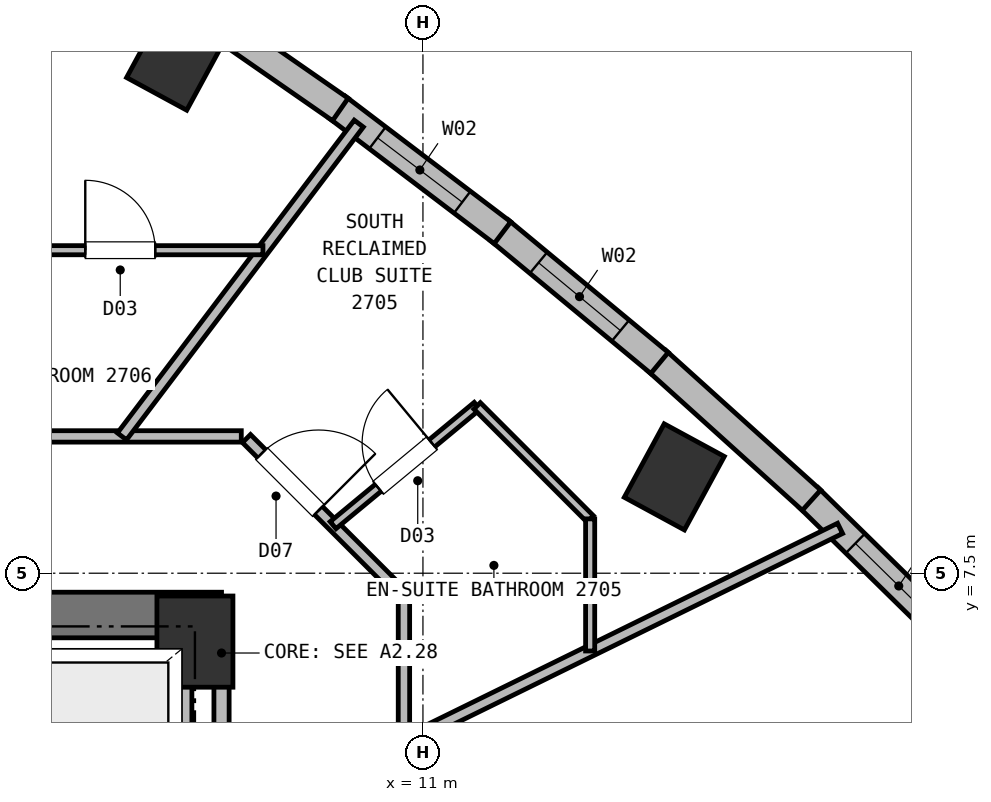
"""IFC4 building model, lengths in metres.
Left out: names, types, materials, properties, quantities, classifications, styles, units other than length and angle.
Written with IfcOpenShell. Run it as: python <this file> out.ifc"""

import sys

from ifc_helpers import new_model, si_unit, direction, frame, frame_2d, origin, origin_2d, place, context, subcontext, project, spatial, rectangle, extrude, element, fill, save


model = new_model("IFC4")
c1 = context("Model", 3, precision=1e-05, world=origin(), true_north=direction((0.0, 1.0)))
c2 = subcontext(c1, "Body", "Model", "MODEL_VIEW")
j1 = project(units=[si_unit("LENGTHUNIT", "METRE"), si_unit("PLANEANGLEUNIT", "RADIAN")], contexts=[c1])
p1 = place(None, origin())
s1 = spatial("IfcSite", under=j1, at=p1, CompositionType="ELEMENT")
p2 = place(p1, origin())
s2 = spatial("IfcBuilding", under=s1, at=p2, CompositionType="ELEMENT")
p3 = place(p2, frame((0.0, 0.0, 101.0)))
s3 = spatial("IfcBuildingStorey", under=s2, at=p3, CompositionType="ELEMENT", Elevation=101.0)
p4 = place(p3, frame((8.0, 6.6, 0.0), z_axis=(0.0, 0.0, 1.0), x_axis=(1.0, 0.0, 0.0)))
e1 = element("IfcColumn", 1, at=p4, inside=s3, PredefinedType="COLUMN", context=c2, shape_type="SweptSolid", body=[
    extrude(rectangle(XDim=1.0, YDim=1.2, at=origin_2d()), origin(), (0.0, 0.0, 1.0), 3.75),
])
p5 = place(p3, frame((-8.35, 6.95, 0.0), z_axis=(0.0, 0.0, 1.0), x_axis=(1.0, 0.0, 0.0)))
e2 = element("IfcWall", 2, at=p5, inside=s3, PredefinedType="SHEAR", context=c2, shape_type="SweptSolid", body=[
    extrude(rectangle(XDim=16.7, YDim=0.6, at=frame_2d((8.35, 0.0))), origin(), (0.0, 0.0, 1.0), 3.5),
])
for number, where, z_axis, x_axis in (
    (3, (14.307, 8.767, 0.0), (0.0, 0.0, 1.0), (-0.879, 0.477, 0.0)),
    (4, (7.759, 14.29, 0.0), (0.0, 0.0, 1.0), (-0.879, 0.477, 0.0)),
):
    element("IfcColumn", number, at=place(p3, frame(where, z_axis=z_axis, x_axis=x_axis)), inside=s3, PredefinedType="COLUMN", context=c2, shape_type="SweptSolid", body=[
        extrude(rectangle(XDim=0.9, YDim=1.1, at=origin_2d()), origin(), (0.0, 0.0, 1.0), 3.75),
    ])
p6 = place(p3, frame((16.075, 8.495, 0.0), z_axis=(0.0, 0.0, 1.0), x_axis=(0.713713584755, -0.70043766242, 0.0)))
e5 = element("IfcWall", 5, at=p6, inside=s3, PredefinedType="SOLIDWALL", context=c2, shape_type="SweptSolid", body=[
    extrude(rectangle(XDim=2.759, YDim=0.36, at=frame_2d((1.379, 0.0))), origin(), (0.0, 0.0, 1.0), 3.5),
])
p7 = place(p6, frame((0.86, 0.0, 0.72)))
e6 = element("IfcOpeningElement", 6, at=p7, cuts=e5, PredefinedType="OPENING", context=c2, shape_type="SweptSolid", body=[
    extrude(rectangle(XDim=1.6, YDim=1.88, at=frame_2d((0.8, 0.94))), frame((0.0, 0.19, 0.0), z_axis=(0.0, -1.0, 0.0), x_axis=(1.0, 0.0, 0.0)), (0.0, 0.0, 1.0), 0.38),
])
p8 = place(p3, frame((14.075, 10.299, 0.0), z_axis=(0.0, 0.0, 1.0), x_axis=(0.742346706701, -0.67001594537, 0.0)))
e7 = element("IfcWall", 7, at=p8, inside=s3, PredefinedType="SOLIDWALL", context=c2, shape_type="SweptSolid", body=[
    extrude(rectangle(XDim=2.744, YDim=0.36, at=frame_2d((1.372, 0.0))), origin(), (0.0, 0.0, 1.0), 3.5),
])
p9 = place(p3, frame((12.007, 12.011, 0.0), z_axis=(0.0, 0.0, 1.0), x_axis=(0.769960149578, -0.63809197461, 0.0)))
e8 = element("IfcWall", 8, at=p9, inside=s3, PredefinedType="SOLIDWALL", context=c2, shape_type="SweptSolid", body=[
    extrude(rectangle(XDim=2.735, YDim=0.36, at=frame_2d((1.367, 0.0))), origin(), (0.0, 0.0, 1.0), 3.5),
])
p10 = place(p9, frame((0.667, 0.0, 0.72)))
e9 = element("IfcOpeningElement", 9, at=p10, cuts=e8, PredefinedType="OPENING", context=c2, shape_type="SweptSolid", body=[
    extrude(rectangle(XDim=1.4, YDim=1.84, at=frame_2d((0.7, 0.92))), frame((0.0, 0.19, 0.0), z_axis=(0.0, -1.0, 0.0), x_axis=(1.0, 0.0, 0.0)), (0.0, 0.0, 1.0), 0.38),
])
p11 = place(p3, frame((9.873, 13.631, 0.0), z_axis=(0.0, 0.0, 1.0), x_axis=(0.796336225349, -0.604854210696, 0.0)))
e10 = element("IfcWall", 10, at=p11, inside=s3, PredefinedType="SOLIDWALL", context=c2, shape_type="SweptSolid", body=[
    extrude(rectangle(XDim=2.73, YDim=0.36, at=frame_2d((1.365, 0.0))), origin(), (0.0, 0.0, 1.0), 3.5),
])
p12 = place(p11, frame((0.665, 0.0, 0.72)))
e11 = element("IfcOpeningElement", 11, at=p12, cuts=e10, PredefinedType="OPENING", context=c2, shape_type="SweptSolid", body=[
    extrude(rectangle(XDim=1.4, YDim=1.84, at=frame_2d((0.7, 0.92))), frame((0.0, 0.19, 0.0), z_axis=(0.0, -1.0, 0.0), x_axis=(1.0, 0.0, 0.0)), (0.0, 0.0, 1.0), 0.38),
])
p13 = place(p3, frame((7.671, 15.159, 0.0), z_axis=(0.0, 0.0, 1.0), x_axis=(0.821331552378, -0.570451120665, 0.0)))
e12 = element("IfcWall", 12, at=p13, inside=s3, PredefinedType="SOLIDWALL", context=c2, shape_type="SweptSolid", body=[
    extrude(rectangle(XDim=2.73, YDim=0.36, at=frame_2d((1.365, 0.0))), origin(), (0.0, 0.0, 1.0), 3.5),
])
p14 = place(p3, frame((7.85, 4.57, 0.0), z_axis=(0.0, 0.0, 1.0), x_axis=(0.0, 1.0, 0.0)))
e13 = element("IfcWall", 13, at=p14, inside=s3, PredefinedType="PARTITIONING", context=c2, shape_type="SweptSolid", body=[
    extrude(rectangle(XDim=2.08, YDim=0.22, at=frame_2d((1.04, 0.0))), origin(), (0.0, 0.0, 1.0), 3.12),
])
p15 = place(p3, frame((8.35, 1.25, 0.0), z_axis=(0.0, 0.0, 1.0), x_axis=(0.0, 1.0, 0.0)))
e14 = element("IfcWall", 14, at=p15, inside=s3, PredefinedType="PARTITIONING", context=c2, shape_type="SweptSolid", body=[
    extrude(rectangle(XDim=5.3, YDim=0.2, at=frame_2d((2.65, 0.0))), origin(), (0.0, 0.0, 1.0), 3.5),
])
p16 = place(p15, frame((0.95, 0.0, 0.0)))
e15 = element("IfcOpeningElement", 15, at=p16, cuts=e14, PredefinedType="OPENING", context=c2, shape_type="SweptSolid", body=[
    extrude(rectangle(XDim=1.15, YDim=2.15, at=frame_2d((0.575, 1.075))), frame((0.0, 0.11, 0.0), z_axis=(0.0, -1.0, 0.0), x_axis=(1.0, 0.0, 0.0)), (0.0, 0.0, 1.0), 0.22),
])
p17 = place(p3, frame((10.75, 7.16, 0.0), z_axis=(0.0, 0.0, 1.0), x_axis=(0.0, -1.0, 0.0)))
e16 = element("IfcWall", 16, at=p17, inside=s3, PredefinedType="PARTITIONING", context=c2, shape_type="SweptSolid", body=[
    extrude(rectangle(XDim=12.92, YDim=0.15, at=frame_2d((6.46, 0.0))), origin(), (0.0, 0.0, 1.0), 3.5),
])
p18 = place(p17, frame((2.937, 0.0, 0.0)))
e17 = element("IfcOpeningElement", 17, at=p18, cuts=e16, PredefinedType="OPENING", context=c2, shape_type="SweptSolid", body=[
    extrude(rectangle(XDim=1.0, YDim=2.15, at=frame_2d((0.5, 1.075))), frame((0.0, 0.085, 0.0), z_axis=(0.0, -1.0, 0.0), x_axis=(1.0, 0.0, 0.0)), (0.0, 0.0, 1.0), 0.17),
])
p19 = place(p17, frame((8.03, 0.0, 0.0)))
e18 = element("IfcOpeningElement", 18, at=p19, cuts=e16, PredefinedType="OPENING", context=c2, shape_type="SweptSolid", body=[
    extrude(rectangle(XDim=1.06, YDim=2.15, at=frame_2d((0.53, 1.075))), frame((0.0, 0.085, 0.0), z_axis=(0.0, -1.0, 0.0), x_axis=(1.0, 0.0, 0.0)), (0.0, 0.0, 1.0), 0.17),
])
p20 = place(p3, frame((8.678, 9.272, 0.0), z_axis=(0.0, 0.0, 1.0), x_axis=(0.707106781187, -0.707106781187, 0.0)))
e19 = element("IfcWall", 19, at=p20, inside=s3, PredefinedType="PARTITIONING", context=c2, shape_type="SweptSolid", body=[
    extrude(rectangle(XDim=2.89, YDim=0.15, at=frame_2d((1.445, 0.0))), origin(), (0.0, 0.0, 1.0), 3.5),
])
p21 = place(p20, frame((0.28, 0.0, 0.0)))
e20 = element("IfcOpeningElement", 20, at=p21, cuts=e19, PredefinedType="OPENING", context=c2, shape_type="SweptSolid", body=[
    extrude(rectangle(XDim=1.06, YDim=2.15, at=frame_2d((0.53, 1.075))), frame((0.0, 0.085, 0.0), z_axis=(0.0, -1.0, 0.0), x_axis=(1.0, 0.0, 0.0)), (0.0, 0.0, 1.0), 0.17),
])
p22 = place(p3, frame((-8.61, 9.3, 0.0), z_axis=(0.0, 0.0, 1.0), x_axis=(1.0, 0.0, 0.0)))
e21 = element("IfcWall", 21, at=p22, inside=s3, PredefinedType="PARTITIONING", context=c2, shape_type="SweptSolid", body=[
    extrude(rectangle(XDim=17.22, YDim=0.15, at=frame_2d((8.61, 0.0))), origin(), (0.0, 0.0, 1.0), 3.5),
])
p23 = place(p22, frame((11.167, 0.0, 0.0)))
e22 = element("IfcOpeningElement", 22, at=p23, cuts=e21, PredefinedType="OPENING", context=c2, shape_type="SweptSolid", body=[
    extrude(rectangle(XDim=1.0, YDim=2.15, at=frame_2d((0.5, 1.075))), frame((0.0, 0.085, 0.0), z_axis=(0.0, -1.0, 0.0), x_axis=(1.0, 0.0, 0.0)), (0.0, 0.0, 1.0), 0.17),
])
p24 = place(p22, frame((6.944, 0.0, 0.0)))
e23 = element("IfcOpeningElement", 23, at=p24, cuts=e21, PredefinedType="OPENING", context=c2, shape_type="SweptSolid", body=[
    extrude(rectangle(XDim=1.06, YDim=2.15, at=frame_2d((0.53, 1.075))), frame((0.0, 0.085, 0.0), z_axis=(0.0, -1.0, 0.0), x_axis=(1.0, 0.0, 0.0)), (0.0, 0.0, 1.0), 0.17),
])
p25 = place(p22, frame((2.311, 0.0, 0.0)))
e24 = element("IfcOpeningElement", 24, at=p25, cuts=e21, PredefinedType="OPENING", context=c2, shape_type="SweptSolid", body=[
    extrude(rectangle(XDim=1.06, YDim=2.15, at=frame_2d((0.53, 1.075))), frame((0.0, 0.085, 0.0), z_axis=(0.0, -1.0, 0.0), x_axis=(1.0, 0.0, 0.0)), (0.0, 0.0, 1.0), 0.17),
])
p26 = place(p3, frame((10.75, 5.274, 0.0), z_axis=(0.0, 0.0, 1.0), x_axis=(0.897755780575, 0.440493539616, 0.0)))
e25 = element("IfcWall", 25, at=p26, inside=s3, PredefinedType="PARTITIONING", context=c2, shape_type="SweptSolid", body=[
    extrude(rectangle(XDim=6.392, YDim=0.15, at=frame_2d((3.196, 0.0))), origin(), (0.0, 0.0, 1.0), 3.5),
])
p27 = place(p3, frame((9.818, 8.132, 0.0), z_axis=(0.0, 0.0, 1.0), x_axis=(0.770088402747, 0.63793718496, 0.0)))
e26 = element("IfcWall", 26, at=p27, inside=s3, PredefinedType="PARTITIONING", context=c2, shape_type="SweptSolid", body=[
    extrude(rectangle(XDim=2.461, YDim=0.12, at=frame_2d((1.23, 0.0))), origin(), (0.0, 0.0, 1.0), 3.5),
])
p28 = place(p27, frame((0.771, 0.0, 0.0)))
e27 = element("IfcOpeningElement", 27, at=p28, cuts=e26, PredefinedType="OPENING", context=c2, shape_type="SweptSolid", body=[
    extrude(rectangle(XDim=0.92, YDim=2.1, at=frame_2d((0.46, 1.05))), frame((0.0, 0.07, 0.0), z_axis=(0.0, -1.0, 0.0), x_axis=(1.0, 0.0, 0.0)), (0.0, 0.0, 1.0), 0.14),
])
p29 = place(p3, frame((11.713, 9.702, 0.0), z_axis=(0.0, 0.0, 1.0), x_axis=(0.707106781187, -0.707106781187, 0.0)))
e28 = element("IfcWall", 28, at=p29, inside=s3, PredefinedType="PARTITIONING", context=c2, shape_type="SweptSolid", body=[
    extrude(rectangle(XDim=2.103, YDim=0.12, at=frame_2d((1.052, 0.0))), origin(), (0.0, 0.0, 1.0), 3.5),
])
p30 = place(p3, frame((13.2, 6.477, 0.0), z_axis=(0.0, 0.0, 1.0), x_axis=(0.0, 1.0, 0.0)))
e29 = element("IfcWall", 29, at=p30, inside=s3, PredefinedType="PARTITIONING", context=c2, shape_type="SweptSolid", body=[
    extrude(rectangle(XDim=1.738, YDim=0.12, at=frame_2d((0.869, 0.0))), origin(), (0.0, 0.0, 1.0), 3.5),
])
p31 = place(p3, frame((7.04, 9.3, 0.0), z_axis=(0.0, 0.0, 1.0), x_axis=(0.603580834167, 0.797301810249, 0.0)))
e30 = element("IfcWall", 30, at=p31, inside=s3, PredefinedType="PARTITIONING", context=c2, shape_type="SweptSolid", body=[
    extrude(rectangle(XDim=5.162, YDim=0.15, at=frame_2d((2.581, 0.0))), origin(), (0.0, 0.0, 1.0), 3.5),
])
p32 = place(p3, frame((5.14, 11.75, 0.0), z_axis=(0.0, 0.0, 1.0), x_axis=(1.0, 0.0, 0.0)))
e31 = element("IfcWall", 31, at=p32, inside=s3, PredefinedType="PARTITIONING", context=c2, shape_type="SweptSolid", body=[
    extrude(rectangle(XDim=3.755, YDim=0.12, at=frame_2d((1.877, 0.0))), origin(), (0.0, 0.0, 1.0), 3.5),
])
p33 = place(p32, frame((1.417, 0.0, 0.0)))
e32 = element("IfcOpeningElement", 32, at=p33, cuts=e31, PredefinedType="OPENING", context=c2, shape_type="SweptSolid", body=[
    extrude(rectangle(XDim=0.92, YDim=2.1, at=frame_2d((0.46, 1.05))), frame((0.0, 0.07, 0.0), z_axis=(0.0, -1.0, 0.0), x_axis=(1.0, 0.0, 0.0)), (0.0, 0.0, 1.0), 0.14),
])
p34 = place(p7, origin())
e33 = element("IfcWindow", 33, at=p34, inside=s3, PartitioningType="SINGLE_PANEL", PredefinedType="WINDOW", context=c2, shape_type="SweptSolid", body=[
    extrude(rectangle(XDim=1.6, YDim=1.88, at=frame_2d((0.8, 0.94))), frame((0.0, 0.03, 0.0), z_axis=(0.0, -1.0, 0.0), x_axis=(1.0, 0.0, 0.0)), (0.0, 0.0, 1.0), 0.06),
])
fill(e6, e33)
p35 = place(p10, origin())
e34 = element("IfcWindow", 34, at=p35, inside=s3, PartitioningType="SINGLE_PANEL", PredefinedType="WINDOW", context=c2, shape_type="SweptSolid", body=[
    extrude(rectangle(XDim=1.4, YDim=1.84, at=frame_2d((0.7, 0.92))), frame((0.0, 0.03, 0.0), z_axis=(0.0, -1.0, 0.0), x_axis=(1.0, 0.0, 0.0)), (0.0, 0.0, 1.0), 0.06),
])
fill(e9, e34)
p36 = place(p12, origin())
e35 = element("IfcWindow", 35, at=p36, inside=s3, PartitioningType="SINGLE_PANEL", PredefinedType="WINDOW", context=c2, shape_type="SweptSolid", body=[
    extrude(rectangle(XDim=1.4, YDim=1.84, at=frame_2d((0.7, 0.92))), frame((0.0, 0.03, 0.0), z_axis=(0.0, -1.0, 0.0), x_axis=(1.0, 0.0, 0.0)), (0.0, 0.0, 1.0), 0.06),
])
fill(e11, e35)
p37 = place(p28, origin())
e36 = element("IfcDoor", 36, at=p37, inside=s3, OperationType="SINGLE_SWING_RIGHT", PredefinedType="DOOR", context=c2, shape_type="SweptSolid", body=[
    extrude(rectangle(XDim=0.92, YDim=2.1, at=frame_2d((0.46, 1.05))), frame((0.0, 0.025, 0.0), z_axis=(0.0, -1.0, 0.0), x_axis=(1.0, 0.0, 0.0)), (0.0, 0.0, 1.0), 0.05),
])
fill(e27, e36)
p38 = place(p33, origin())
e37 = element("IfcDoor", 37, at=p38, inside=s3, OperationType="SINGLE_SWING_LEFT", PredefinedType="DOOR", context=c2, shape_type="SweptSolid", body=[
    extrude(rectangle(XDim=0.92, YDim=2.1, at=frame_2d((0.46, 1.05))), frame((0.0, 0.025, 0.0), z_axis=(0.0, -1.0, 0.0), x_axis=(1.0, 0.0, 0.0)), (0.0, 0.0, 1.0), 0.05),
])
fill(e32, e37)
p39 = place(p21, origin())
e38 = element("IfcDoor", 38, at=p39, inside=s3, OperationType="SINGLE_SWING_RIGHT", PredefinedType="DOOR", context=c2, shape_type="SweptSolid", body=[
    extrude(rectangle(XDim=1.06, YDim=2.15, at=frame_2d((0.53, 1.075))), frame((0.0, 0.025, 0.0), z_axis=(0.0, -1.0, 0.0), x_axis=(1.0, 0.0, 0.0)), (0.0, 0.0, 1.0), 0.05),
])
fill(e20, e38)
save(model, sys.argv[1])
